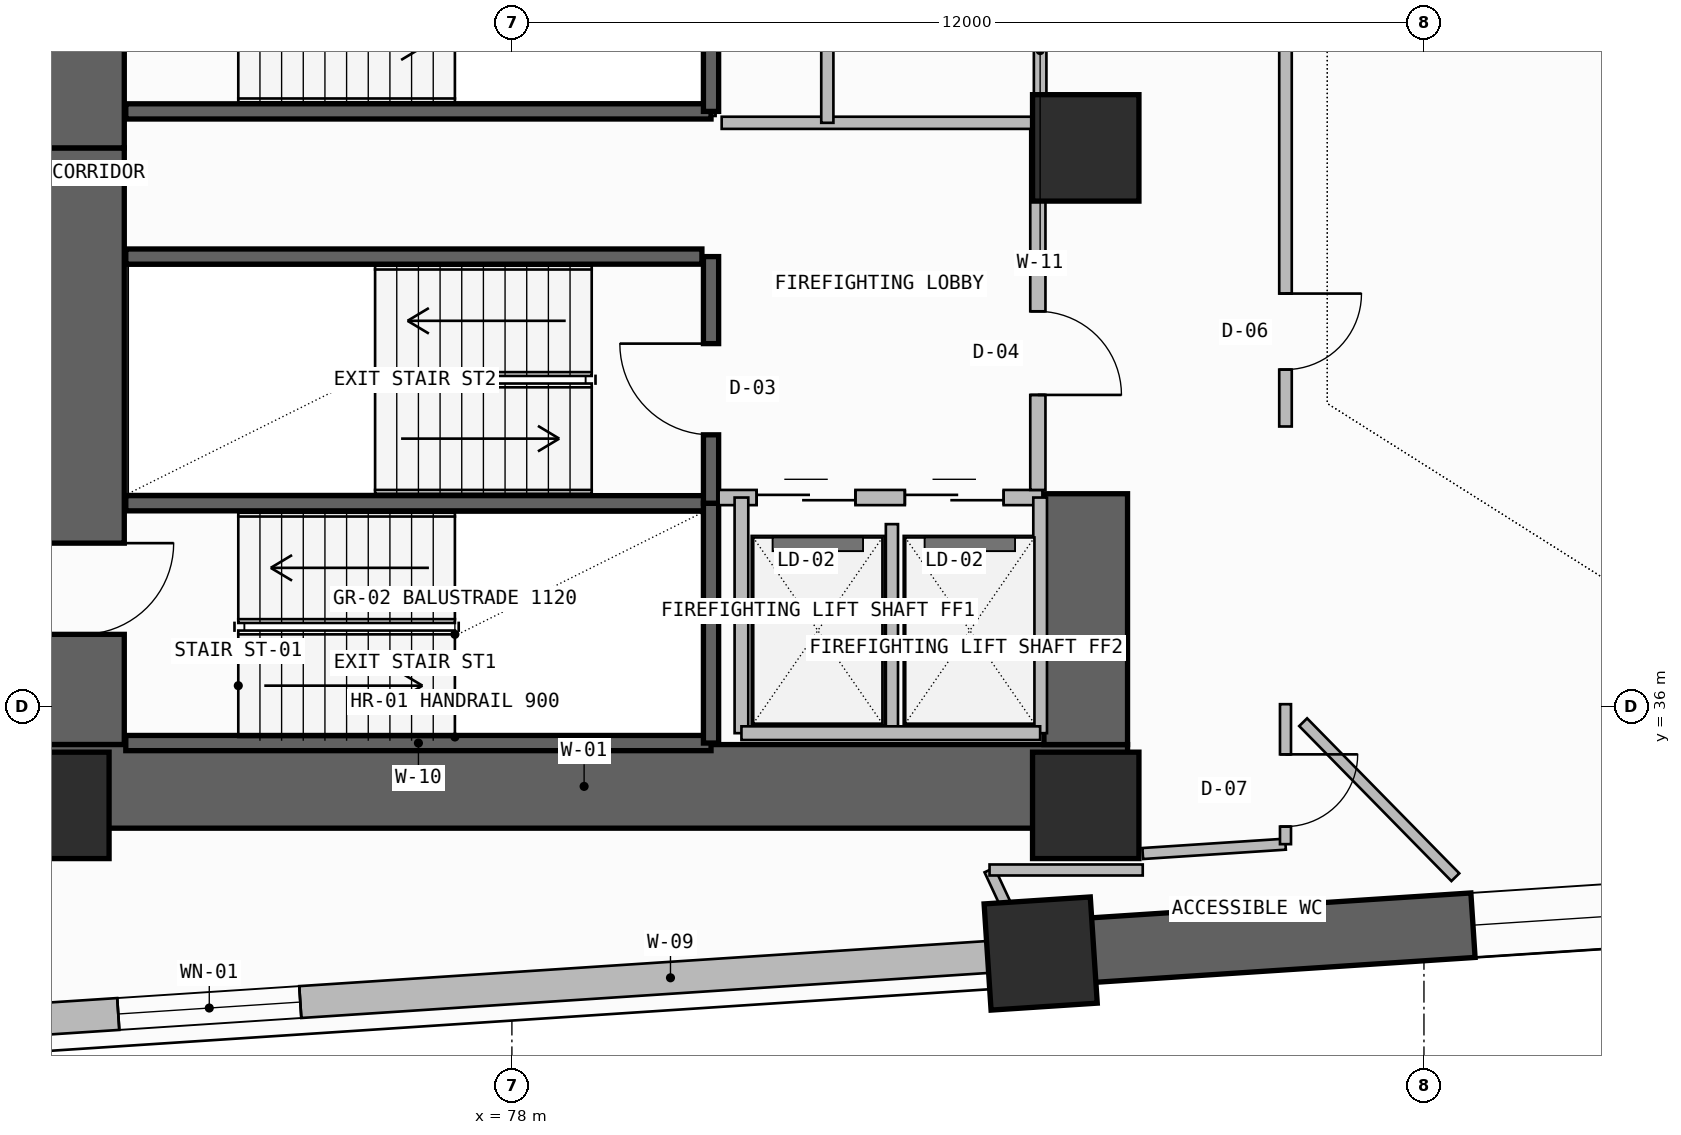
"""IFC4 building model, lengths in metres.
Left out: names, types, materials, properties, quantities, classifications, styles, units other than length and angle.
Written with IfcOpenShell. Run it as: python <this file> out.ifc"""

import sys

from ifc_helpers import new_model, si_unit, direction, frame, frame_2d, origin, origin_2d, place, context, subcontext, project, spatial, rectangle, extrude, element, fill, save


model = new_model("IFC4")
c1 = context("Model", 3, precision=1e-05, world=origin(), true_north=direction((0.0, 1.0)))
c2 = subcontext(c1, "Body", "Model", "MODEL_VIEW")
j1 = project(units=[si_unit("LENGTHUNIT", "METRE"), si_unit("PLANEANGLEUNIT", "RADIAN")], contexts=[c1])
p1 = place(None, origin())
s1 = spatial("IfcSite", under=j1, at=p1, CompositionType="ELEMENT")
p2 = place(p1, origin())
s2 = spatial("IfcBuilding", under=s1, at=p2, CompositionType="ELEMENT")
p3 = place(p2, frame((0.0, 0.0, 63.3)))
s3 = spatial("IfcBuildingStorey", under=s2, at=p3, CompositionType="ELEMENT", Elevation=63.3)
p4 = place(p3, frame((72.35, 35.5, -0.4), z_axis=(0.0, 0.0, 1.0), x_axis=(0.0, 1.0, 0.0)))
e1 = element("IfcWall", 1, at=p4, inside=s3, PredefinedType="SHEAR", context=c2, shape_type="SweptSolid", body=[
    extrude(rectangle(XDim=7.85, YDim=1.1, at=frame_2d((3.925, 0.0))), origin(), (0.0, 0.0, 1.0), 3.74),
])
p5 = place(p4, frame((1.45, 0.0, 0.4)))
e2 = element("IfcOpeningElement", 2, at=p5, cuts=e1, PredefinedType="OPENING", context=c2, shape_type="SweptSolid", body=[
    extrude(rectangle(XDim=1.2, YDim=2.2, at=frame_2d((0.6, 1.1))), frame((0.0, 0.56, 0.0), z_axis=(0.0, -1.0, 0.0), x_axis=(1.0, 0.0, 0.0)), (0.0, 0.0, 1.0), 1.12),
])
p6 = place(p3, frame((71.8, 34.95, -0.4), z_axis=(0.0, 0.0, 1.0), x_axis=(1.0, 0.0, 0.0)))
e3 = element("IfcWall", 3, at=p6, inside=s3, PredefinedType="SHEAR", context=c2, shape_type="SweptSolid", body=[
    extrude(rectangle(XDim=14.3, YDim=1.1, at=frame_2d((7.15, 0.0))), origin(), (0.0, 0.0, 1.0), 3.74),
])
p7 = place(p3, frame((85.55, 35.5, -0.4), z_axis=(0.0, 0.0, 1.0), x_axis=(0.0, 1.0, 0.0)))
e4 = element("IfcWall", 4, at=p7, inside=s3, PredefinedType="SHEAR", context=c2, shape_type="SweptSolid", body=[
    extrude(rectangle(XDim=3.3, YDim=1.1, at=frame_2d((1.65, 0.0))), origin(), (0.0, 0.0, 1.0), 3.74),
])
p8 = place(p3, frame((72.35, 43.35, -0.4), z_axis=(0.0, 0.0, 1.0), x_axis=(0.0, 1.0, 0.0)))
e5 = element("IfcWall", 5, at=p8, inside=s3, PredefinedType="SHEAR", context=c2, shape_type="SweptSolid", body=[
    extrude(rectangle(XDim=12.7, YDim=1.1, at=frame_2d((6.35, 0.0))), origin(), (0.0, 0.0, 1.0), 3.74),
])
p9 = place(p8, frame((1.35, 0.0, 0.4)))
e6 = element("IfcOpeningElement", 6, at=p9, cuts=e5, PredefinedType="OPENING", context=c2, shape_type="SweptSolid", body=[
    extrude(rectangle(XDim=1.2, YDim=2.2, at=frame_2d((0.6, 1.1))), frame((0.0, 0.56, 0.0), z_axis=(0.0, -1.0, 0.0), x_axis=(1.0, 0.0, 0.0)), (0.0, 0.0, 1.0), 1.12),
])
for number, where, z_axis, x_axis in (
    (7, (72.0, 34.7, 0.0), (0.0, 0.0, 1.0), (1.0, 0.0, 0.0)),
    (8, (85.55, 34.7, 0.0), (0.0, 0.0, 1.0), (1.0, 0.0, 0.0)),
    (9, (85.55, 43.35, 0.0), (0.0, 0.0, 1.0), (1.0, 0.0, 0.0)),
):
    element("IfcColumn", number, at=place(p3, frame(where, z_axis=z_axis, x_axis=x_axis)), inside=s3, PredefinedType="COLUMN", context=c2, shape_type="SweptSolid", body=[
        extrude(rectangle(XDim=1.4, YDim=1.4, at=origin_2d()), origin(), (0.0, 0.0, 1.0), 3.6),
    ])
p10 = place(p3, frame((84.957, 32.751, -0.4), z_axis=(0.0, 0.0, 1.0), x_axis=(0.997858923239, 0.06540312923, 0.0)))
e10 = element("IfcColumn", 10, at=p10, inside=s3, PredefinedType="COLUMN", context=c2, shape_type="SweptSolid", body=[
    extrude(rectangle(XDim=1.4, YDim=1.4, at=origin_2d()), origin(), (0.0, 0.0, 1.0), 4.0),
])
p11 = place(p3, frame((67.133, 31.583, 0.0), z_axis=(0.0, 0.0, 1.0), x_axis=(0.997859040617, 0.065401338356, 0.0)))
e11 = element("IfcWall", 11, at=p11, inside=s3, PredefinedType="SOLIDWALL", context=c2, shape_type="SweptSolid", body=[
    extrude(rectangle(XDim=17.862, YDim=0.42, at=frame_2d((8.931, 0.0))), origin(), (0.0, 0.0, 1.0), 2.325),
])
p12 = place(p11, frame((5.7, 0.0, 1.2)))
e12 = element("IfcOpeningElement", 12, at=p12, cuts=e11, PredefinedType="OPENING", context=c2, shape_type="SweptSolid", body=[
    extrude(rectangle(XDim=2.4, YDim=0.9, at=frame_2d((1.2, 0.45))), frame((0.0, 0.22, 0.0), z_axis=(0.0, -1.0, 0.0), x_axis=(1.0, 0.0, 0.0)), (0.0, 0.0, 1.0), 0.44),
])
p13 = place(p3, frame((84.957, 32.751, -0.4), z_axis=(0.0, 0.0, 1.0), x_axis=(0.997859046449, 0.065401249368, 0.0)))
e13 = element("IfcWall", 13, at=p13, inside=s3, PredefinedType="SHEAR", context=c2, shape_type="SweptSolid", body=[
    extrude(rectangle(XDim=28.4, YDim=0.85, at=frame_2d((14.2, 0.0))), origin(), (0.0, 0.0, 1.0), 3.74),
])
p14 = place(p13, frame((5.7, 0.0, 1.2)))
e14 = element("IfcOpeningElement", 14, at=p14, cuts=e13, PredefinedType="OPENING", context=c2, shape_type="SweptSolid", body=[
    extrude(rectangle(XDim=2.4, YDim=0.9, at=frame_2d((1.2, 0.45))), frame((0.0, 0.435, 0.0), z_axis=(0.0, -1.0, 0.0), x_axis=(1.0, 0.0, 0.0)), (0.0, 0.0, 1.0), 0.87),
])
for number, where, z_axis, x_axis in (
    (15, (72.92, 35.52, -0.4), (0.0, 0.0, 1.0), (1.0, 0.0, 0.0)),
    (16, (72.92, 38.675, -0.4), (0.0, 0.0, 1.0), (1.0, 0.0, 0.0)),
):
    element("IfcWall", number, at=place(p3, frame(where, z_axis=z_axis, x_axis=x_axis)), inside=s3, PredefinedType="SOLIDWALL", context=c2, shape_type="SweptSolid", body=[
        extrude(rectangle(XDim=7.7, YDim=0.2, at=frame_2d((3.85, 0.0))), origin(), (0.0, 0.0, 1.0), 3.74),
    ])
p15 = place(p3, frame((80.62, 35.52, -0.4), z_axis=(0.0, 0.0, 1.0), x_axis=(0.0, 1.0, 0.0)))
e17 = element("IfcWall", 17, at=p15, inside=s3, PredefinedType="SOLIDWALL", context=c2, shape_type="SweptSolid", body=[
    extrude(rectangle(XDim=3.155, YDim=0.2, at=frame_2d((1.578, 0.0))), origin(), (0.0, 0.0, 1.0), 3.74),
])
p16 = place(p3, frame((80.62, 38.675, -0.4), z_axis=(0.0, 0.0, 1.0), x_axis=(0.0, 1.0, 0.0)))
e18 = element("IfcWall", 18, at=p16, inside=s3, PredefinedType="SOLIDWALL", context=c2, shape_type="SweptSolid", body=[
    extrude(rectangle(XDim=3.245, YDim=0.2, at=frame_2d((1.623, 0.0))), origin(), (0.0, 0.0, 1.0), 3.74),
])
p17 = place(p16, frame((0.9, 0.0, 0.4)))
e19 = element("IfcOpeningElement", 19, at=p17, cuts=e18, PredefinedType="OPENING", context=c2, shape_type="SweptSolid", body=[
    extrude(rectangle(XDim=1.2, YDim=2.2, at=frame_2d((0.6, 1.1))), frame((0.0, 0.11, 0.0), z_axis=(0.0, -1.0, 0.0), x_axis=(1.0, 0.0, 0.0)), (0.0, 0.0, 1.0), 0.22),
])
p18 = place(p3, frame((80.72, 38.75, 0.0), z_axis=(0.0, 0.0, 1.0), x_axis=(1.0, 0.0, 0.0)))
e20 = element("IfcWall", 20, at=p18, inside=s3, PredefinedType="SOLIDWALL", context=c2, shape_type="SweptSolid", body=[
    extrude(rectangle(XDim=4.26, YDim=0.2, at=frame_2d((2.13, 0.0))), origin(), (0.0, 0.0, 1.0), 3.34),
])
p19 = place(p18, frame((0.5, 0.0, 0.0)))
e21 = element("IfcOpeningElement", 21, at=p19, cuts=e20, PredefinedType="OPENING", context=c2, shape_type="SweptSolid", body=[
    extrude(rectangle(XDim=1.3, YDim=2.3, at=frame_2d((0.65, 1.15))), frame((0.0, 0.11, 0.0), z_axis=(0.0, -1.0, 0.0), x_axis=(1.0, 0.0, 0.0)), (0.0, 0.0, 1.0), 0.22),
])
p20 = place(p18, frame((2.45, 0.0, 0.0)))
e22 = element("IfcOpeningElement", 22, at=p20, cuts=e20, PredefinedType="OPENING", context=c2, shape_type="SweptSolid", body=[
    extrude(rectangle(XDim=1.3, YDim=2.3, at=frame_2d((0.65, 1.15))), frame((0.0, 0.11, 0.0), z_axis=(0.0, -1.0, 0.0), x_axis=(1.0, 0.0, 0.0)), (0.0, 0.0, 1.0), 0.22),
])
p21 = place(p3, frame((83.0, 35.65, 0.0), z_axis=(0.0, 0.0, 1.0), x_axis=(0.0, 1.0, 0.0)))
e23 = element("IfcWall", 23, at=p21, inside=s3, PredefinedType="PLUMBINGWALL", context=c2, shape_type="SweptSolid", body=[
    extrude(rectangle(XDim=2.75, YDim=0.16, at=frame_2d((1.375, 0.0))), origin(), (0.0, 0.0, 1.0), 3.34),
])
for number, where, z_axis, x_axis in (
    (24, (84.95, 35.65, 0.0), (0.0, 0.0, 1.0), (0.0, 1.0, 0.0)),
    (25, (81.02, 35.65, 0.0), (0.0, 0.0, 1.0), (0.0, 1.0, 0.0)),
):
    element("IfcWall", number, at=place(p3, frame(where, z_axis=z_axis, x_axis=x_axis)), inside=s3, PredefinedType="SOLIDWALL", context=c2, shape_type="SweptSolid", body=[
        extrude(rectangle(XDim=3.1, YDim=0.18, at=frame_2d((1.55, 0.0))), origin(), (0.0, 0.0, 1.0), 3.34),
    ])
p22 = place(p3, frame((81.02, 35.65, 0.0), z_axis=(0.0, 0.0, 1.0), x_axis=(1.0, 0.0, 0.0)))
e26 = element("IfcWall", 26, at=p22, inside=s3, PredefinedType="SOLIDWALL", context=c2, shape_type="SweptSolid", body=[
    extrude(rectangle(XDim=3.93, YDim=0.18, at=frame_2d((1.965, 0.0))), origin(), (0.0, 0.0, 1.0), 3.34),
])
p23 = place(p3, frame((84.92, 38.85, 0.0), z_axis=(0.0, 0.0, 1.0), x_axis=(0.0, 1.0, 0.0)))
e27 = element("IfcWall", 27, at=p23, inside=s3, PredefinedType="SOLIDWALL", context=c2, shape_type="SweptSolid", body=[
    extrude(rectangle(XDim=4.83, YDim=0.2, at=frame_2d((2.415, 0.0))), origin(), (0.0, 0.0, 1.0), 3.34),
])
p24 = place(p23, frame((1.25, 0.0, 0.0)))
e28 = element("IfcOpeningElement", 28, at=p24, cuts=e27, PredefinedType="OPENING", context=c2, shape_type="SweptSolid", body=[
    extrude(rectangle(XDim=1.1, YDim=2.2, at=frame_2d((0.55, 1.1))), frame((0.0, 0.11, 0.0), z_axis=(0.0, -1.0, 0.0), x_axis=(1.0, 0.0, 0.0)), (0.0, 0.0, 1.0), 0.22),
])
p25 = place(p3, frame((72.92, 41.92, -0.4), z_axis=(0.0, 0.0, 1.0), x_axis=(1.0, 0.0, 0.0)))
e29 = element("IfcWall", 29, at=p25, inside=s3, PredefinedType="SOLIDWALL", context=c2, shape_type="SweptSolid", body=[
    extrude(rectangle(XDim=7.58, YDim=0.2, at=frame_2d((3.79, 0.0))), origin(), (0.0, 0.0, 1.0), 3.74),
])
p26 = place(p3, frame((72.92, 43.83, -0.4), z_axis=(0.0, 0.0, 1.0), x_axis=(1.0, 0.0, 0.0)))
e30 = element("IfcWall", 30, at=p26, inside=s3, PredefinedType="SOLIDWALL", context=c2, shape_type="SweptSolid", body=[
    extrude(rectangle(XDim=7.7, YDim=0.2, at=frame_2d((3.85, 0.0))), origin(), (0.0, 0.0, 1.0), 3.74),
])
p27 = place(p3, frame((80.62, 43.83, -0.4), z_axis=(0.0, 0.0, 1.0), x_axis=(0.0, 1.0, 0.0)))
e31 = element("IfcWall", 31, at=p27, inside=s3, PredefinedType="SOLIDWALL", context=c2, shape_type="SweptSolid", body=[
    extrude(rectangle(XDim=3.24, YDim=0.2, at=frame_2d((1.62, 0.0))), origin(), (0.0, 0.0, 1.0), 3.74),
])
p28 = place(p3, frame((84.95, 43.68, 0.0), z_axis=(0.0, 0.0, 1.0), x_axis=(0.0, 1.0, 0.0)))
e32 = element("IfcWall", 32, at=p28, inside=s3, PredefinedType="PLUMBINGWALL", context=c2, shape_type="SweptSolid", body=[
    extrude(rectangle(XDim=1.9, YDim=0.165, at=frame_2d((0.95, 0.0))), origin(), (0.0, 0.0, 1.0), 3.34),
])
p29 = place(p3, frame((80.76, 43.68, 0.0), z_axis=(0.0, 0.0, 1.0), x_axis=(1.0, 0.0, 0.0)))
e33 = element("IfcWall", 33, at=p29, inside=s3, PredefinedType="PLUMBINGWALL", context=c2, shape_type="SweptSolid", body=[
    extrude(rectangle(XDim=4.19, YDim=0.16, at=frame_2d((2.095, 0.0))), origin(), (0.0, 0.0, 1.0), 3.34),
])
p30 = place(p3, frame((82.15, 43.68, 0.0), z_axis=(0.0, 0.0, 1.0), x_axis=(0.0, 1.0, 0.0)))
e34 = element("IfcWall", 34, at=p30, inside=s3, PredefinedType="PLUMBINGWALL", context=c2, shape_type="SweptSolid", body=[
    extrude(rectangle(XDim=1.9, YDim=0.16, at=frame_2d((0.95, 0.0))), origin(), (0.0, 0.0, 1.0), 3.34),
])
p31 = place(p3, frame((86.3, 34.067, 0.0), z_axis=(0.0, 0.0, 1.0), x_axis=(0.997860280321, 0.065382420863, 0.0)))
e35 = element("IfcWall", 35, at=p31, inside=s3, PredefinedType="PARTITIONING", context=c2, shape_type="SweptSolid", body=[
    extrude(rectangle(XDim=1.882, YDim=0.145, at=frame_2d((0.941, 0.0))), origin(), (0.0, 0.0, 1.0), 3.34),
])
p32 = place(p3, frame((88.178, 34.19, 0.0), z_axis=(0.0, 0.0, 1.0), x_axis=(0.0, 1.0, 0.0)))
e36 = element("IfcWall", 36, at=p32, inside=s3, PredefinedType="PARTITIONING", context=c2, shape_type="SweptSolid", body=[
    extrude(rectangle(XDim=1.842, YDim=0.145, at=frame_2d((0.921, 0.0))), origin(), (0.0, 0.0, 1.0), 2.725),
])
p33 = place(p32, frame((0.231, 0.0, 0.0)))
e37 = element("IfcOpeningElement", 37, at=p33, cuts=e36, PredefinedType="OPENING", context=c2, shape_type="SweptSolid", body=[
    extrude(rectangle(XDim=0.95, YDim=2.15, at=frame_2d((0.475, 1.075))), frame((0.0, 0.083, 0.0), z_axis=(0.0, -1.0, 0.0), x_axis=(1.0, 0.0, 0.0)), (0.0, 0.0, 1.0), 0.165),
])
p34 = place(p3, frame((88.178, 39.685, 0.0), z_axis=(0.0, 0.0, 1.0), x_axis=(0.0, 1.0, 0.0)))
e38 = element("IfcWall", 38, at=p34, inside=s3, PredefinedType="PARTITIONING", context=c2, shape_type="SweptSolid", body=[
    extrude(rectangle(XDim=5.973, YDim=0.165, at=frame_2d((2.986, 0.0))), origin(), (0.0, 0.0, 1.0), 2.725),
])
p35 = place(p34, frame((0.749, 0.0, 0.0)))
e39 = element("IfcOpeningElement", 39, at=p35, cuts=e38, PredefinedType="OPENING", context=c2, shape_type="SweptSolid", body=[
    extrude(rectangle(XDim=1.0, YDim=2.2, at=frame_2d((0.5, 1.1))), frame((0.0, 0.093, 0.0), z_axis=(0.0, -1.0, 0.0), x_axis=(1.0, 0.0, 0.0)), (0.0, 0.0, 1.0), 0.185),
])
p36 = place(p3, frame((88.411, 35.794, 0.0), z_axis=(0.0, 0.0, 1.0), x_axis=(0.700585335426, -0.713568628645, 0.0)))
e40 = element("IfcWall", 40, at=p36, inside=s3, PredefinedType="PARTITIONING", context=c2, shape_type="SweptSolid", body=[
    extrude(rectangle(XDim=2.858, YDim=0.145, at=frame_2d((1.429, 0.0))), origin(), (0.0, 0.0, 1.0), 2.725),
])
p37 = place(p3, frame((84.606, 33.159, 0.0), z_axis=(0.0, 0.0, 1.0), x_axis=(-0.421938848162, 0.906624292864, 0.0)))
e41 = element("IfcWall", 41, at=p37, inside=s3, PredefinedType="PARTITIONING", context=c2, shape_type="SweptSolid", body=[
    extrude(rectangle(XDim=0.763, YDim=0.145, at=frame_2d((0.381, 0.0))), origin(), (0.0, 0.0, 1.0), 3.34),
])
p38 = place(p3, frame((84.284, 33.85, 0.0), z_axis=(0.0, 0.0, 1.0), x_axis=(1.0, 0.0, 0.0)))
e42 = element("IfcWall", 42, at=p38, inside=s3, PredefinedType="PARTITIONING", context=c2, shape_type="SweptSolid", body=[
    extrude(rectangle(XDim=2.016, YDim=0.145, at=frame_2d((1.008, 0.0))), origin(), (0.0, 0.0, 1.0), 2.725),
])
p39 = place(p12, origin())
e43 = element("IfcWindow", 43, at=p39, inside=s3, PartitioningType="SINGLE_PANEL", PredefinedType="WINDOW", context=c2, shape_type="SweptSolid", body=[
    extrude(rectangle(XDim=2.4, YDim=0.9, at=frame_2d((1.2, 0.45))), frame((0.0, 0.03, 0.0), z_axis=(0.0, -1.0, 0.0), x_axis=(1.0, 0.0, 0.0)), (0.0, 0.0, 1.0), 0.06),
])
fill(e12, e43)
p40 = place(p14, origin())
e44 = element("IfcWindow", 44, at=p40, inside=s3, PartitioningType="SINGLE_PANEL", PredefinedType="WINDOW", context=c2, shape_type="SweptSolid", body=[
    extrude(rectangle(XDim=2.4, YDim=0.9, at=frame_2d((1.2, 0.45))), frame((0.0, 0.03, 0.0), z_axis=(0.0, -1.0, 0.0), x_axis=(1.0, 0.0, 0.0)), (0.0, 0.0, 1.0), 0.06),
])
fill(e14, e44)
p41 = place(p5, frame((1.2, 0.0, 0.0), z_axis=(0.0, 0.0, 1.0), x_axis=(-1.0, 0.0, 0.0)))
e45 = element("IfcDoor", 45, at=p41, inside=s3, OperationType="SINGLE_SWING_LEFT", PredefinedType="USERDEFINED", context=c2, shape_type="SweptSolid", body=[
    extrude(rectangle(XDim=1.2, YDim=2.2, at=frame_2d((0.6, 1.1))), frame((0.0, 0.025, 0.0), z_axis=(0.0, -1.0, 0.0), x_axis=(1.0, 0.0, 0.0)), (0.0, 0.0, 1.0), 0.05),
])
fill(e2, e45)
p42 = place(p17, origin())
e46 = element("IfcDoor", 46, at=p42, inside=s3, OperationType="SINGLE_SWING_RIGHT", PredefinedType="USERDEFINED", context=c2, shape_type="SweptSolid", body=[
    extrude(rectangle(XDim=1.2, YDim=2.2, at=frame_2d((0.6, 1.1))), frame((0.0, 0.025, 0.0), z_axis=(0.0, -1.0, 0.0), x_axis=(1.0, 0.0, 0.0)), (0.0, 0.0, 1.0), 0.05),
])
fill(e19, e46)
p43 = place(p19, origin())
e47 = element("IfcDoor", 47, at=p43, inside=s3, OperationType="DOUBLE_DOOR_SLIDING", PredefinedType="DOOR", context=c2, shape_type="SweptSolid", body=[
    extrude(rectangle(XDim=1.3, YDim=2.3, at=frame_2d((0.65, 1.15))), frame((0.0, 0.025, 0.0), z_axis=(0.0, -1.0, 0.0), x_axis=(1.0, 0.0, 0.0)), (0.0, 0.0, 1.0), 0.05),
])
fill(e21, e47)
p44 = place(p20, origin())
e48 = element("IfcDoor", 48, at=p44, inside=s3, OperationType="DOUBLE_DOOR_SLIDING", PredefinedType="DOOR", context=c2, shape_type="SweptSolid", body=[
    extrude(rectangle(XDim=1.3, YDim=2.3, at=frame_2d((0.65, 1.15))), frame((0.0, 0.025, 0.0), z_axis=(0.0, -1.0, 0.0), x_axis=(1.0, 0.0, 0.0)), (0.0, 0.0, 1.0), 0.05),
])
fill(e22, e48)
p45 = place(p24, frame((1.1, 0.0, 0.0), z_axis=(0.0, 0.0, 1.0), x_axis=(-1.0, 0.0, 0.0)))
e49 = element("IfcDoor", 49, at=p45, inside=s3, OperationType="SINGLE_SWING_RIGHT", PredefinedType="DOOR", context=c2, shape_type="SweptSolid", body=[
    extrude(rectangle(XDim=1.1, YDim=2.2, at=frame_2d((0.55, 1.1))), frame((0.0, 0.025, 0.0), z_axis=(0.0, -1.0, 0.0), x_axis=(1.0, 0.0, 0.0)), (0.0, 0.0, 1.0), 0.05),
])
fill(e28, e49)
p46 = place(p33, frame((0.95, 0.0, 0.0), z_axis=(0.0, 0.0, 1.0), x_axis=(-1.0, 0.0, 0.0)))
e50 = element("IfcDoor", 50, at=p46, inside=s3, OperationType="SINGLE_SWING_LEFT", PredefinedType="DOOR", context=c2, shape_type="SweptSolid", body=[
    extrude(rectangle(XDim=0.95, YDim=2.15, at=frame_2d((0.475, 1.075))), frame((0.0, 0.025, 0.0), z_axis=(0.0, -1.0, 0.0), x_axis=(1.0, 0.0, 0.0)), (0.0, 0.0, 1.0), 0.05),
])
fill(e37, e50)
p47 = place(p35, frame((1.0, 0.0, 0.0), z_axis=(0.0, 0.0, 1.0), x_axis=(-1.0, 0.0, 0.0)))
e51 = element("IfcDoor", 51, at=p47, inside=s3, OperationType="SINGLE_SWING_LEFT", PredefinedType="DOOR", context=c2, shape_type="SweptSolid", body=[
    extrude(rectangle(XDim=1.0, YDim=2.2, at=frame_2d((0.5, 1.1))), frame((0.0, 0.025, 0.0), z_axis=(0.0, -1.0, 0.0), x_axis=(1.0, 0.0, 0.0)), (0.0, 0.0, 1.0), 0.05),
])
fill(e39, e51)
save(model, sys.argv[1])
